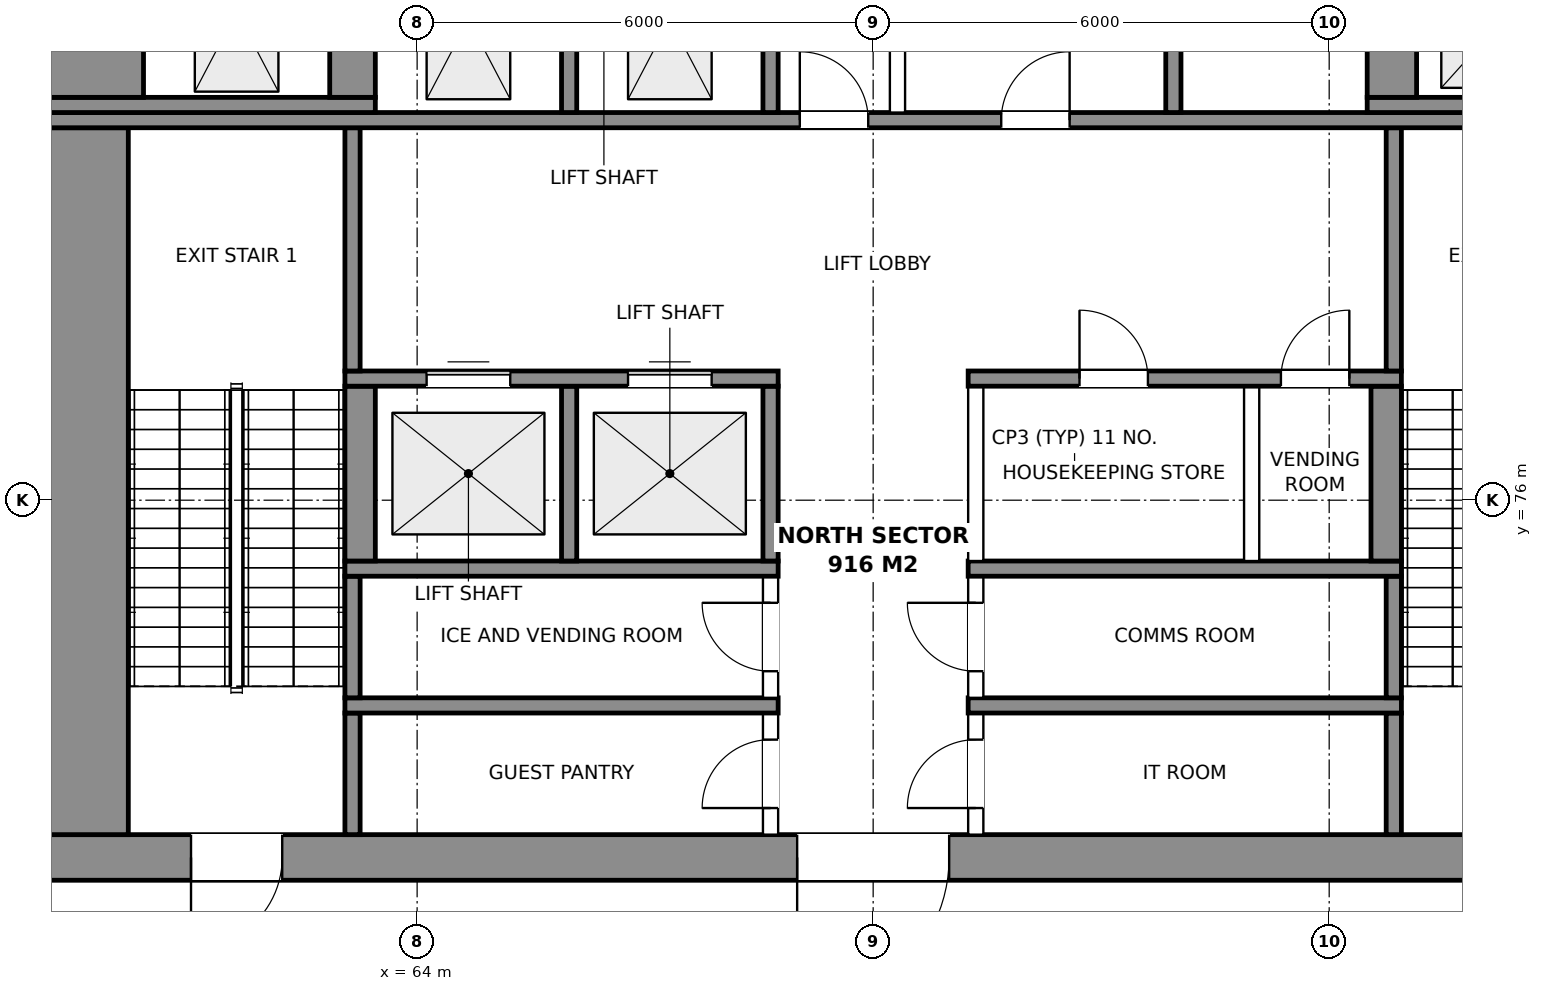
"""IFC4 building model, lengths in metres.
Left out: names, types, materials, properties, quantities, classifications, styles, units other than length and angle.
Written with IfcOpenShell. Run it as: python <this file> out.ifc"""

import sys

from ifc_helpers import new_model, si_unit, direction, frame, frame_2d, origin, place, context, subcontext, project, spatial, rectangle, extrude, element, fill, save


model = new_model("IFC4")
c1 = context("Model", 3, precision=1e-05, world=origin(), true_north=direction((0.0, 1.0)))
c2 = subcontext(c1, "Body", "Model", "MODEL_VIEW")
j1 = project(units=[si_unit("LENGTHUNIT", "METRE"), si_unit("PLANEANGLEUNIT", "RADIAN")], contexts=[c1])
p1 = place(None, origin())
s1 = spatial("IfcSite", under=j1, at=p1, CompositionType="ELEMENT")
p2 = place(p1, origin())
s2 = spatial("IfcBuilding", under=s1, at=p2, CompositionType="ELEMENT")
p3 = place(p2, frame((0.0, 0.0, 300.1)))
s3 = spatial("IfcBuildingStorey", under=s2, at=p3, CompositionType="ELEMENT", Elevation=300.1)
p4 = place(p3, frame((59.0, 71.3, 0.0), z_axis=(0.0, 0.0, 1.0), x_axis=(1.0, 0.0, 0.0)))
e1 = element("IfcWall", 1, at=p4, inside=s3, PredefinedType="SHEAR", context=c2, shape_type="SweptSolid", body=[
    extrude(rectangle(XDim=22.0, YDim=0.6, at=frame_2d((11.0, 0.0))), origin(), (0.0, 0.0, 1.0), 6.0),
])
p5 = place(p4, frame((2.025, 0.0, 0.0)))
e2 = element("IfcOpeningElement", 2, at=p5, cuts=e1, PredefinedType="OPENING", context=c2, shape_type="SweptSolid", body=[
    extrude(rectangle(XDim=1.2, YDim=2.1, at=frame_2d((0.6, 1.05))), frame((0.0, 0.31, 0.0), z_axis=(0.0, -1.0, 0.0), x_axis=(1.0, 0.0, 0.0)), (0.0, 0.0, 1.0), 0.62),
])
p6 = place(p4, frame((18.775, 0.0, 0.0)))
e3 = element("IfcOpeningElement", 3, at=p6, cuts=e1, PredefinedType="OPENING", context=c2, shape_type="SweptSolid", body=[
    extrude(rectangle(XDim=1.2, YDim=2.1, at=frame_2d((0.6, 1.05))), frame((0.0, 0.31, 0.0), z_axis=(0.0, -1.0, 0.0), x_axis=(1.0, 0.0, 0.0)), (0.0, 0.0, 1.0), 0.62),
])
p7 = place(p4, frame((10.0, 0.0, 0.0)))
e4 = element("IfcOpeningElement", 4, at=p7, cuts=e1, PredefinedType="OPENING", context=c2, shape_type="SweptSolid", body=[
    extrude(rectangle(XDim=2.0, YDim=2.1, at=frame_2d((1.0, 1.05))), frame((0.0, 0.31, 0.0), z_axis=(0.0, -1.0, 0.0), x_axis=(1.0, 0.0, 0.0)), (0.0, 0.0, 1.0), 0.62),
])
p8 = place(p3, frame((59.6, 71.6, 0.0), z_axis=(0.0, 0.0, 1.0), x_axis=(0.0, 1.0, 0.0)))
e5 = element("IfcWall", 5, at=p8, inside=s3, PredefinedType="SHEAR", context=c2, shape_type="SweptSolid", body=[
    extrude(rectangle(XDim=9.3, YDim=1.2, at=frame_2d((4.65, 0.0))), origin(), (0.0, 0.0, 1.0), 6.0),
])
p9 = place(p3, frame((63.15, 71.6, 0.0), z_axis=(0.0, 0.0, 1.0), x_axis=(0.0, 1.0, 0.0)))
e6 = element("IfcWall", 6, at=p9, inside=s3, PredefinedType="SHEAR", context=c2, shape_type="SweptSolid", body=[
    extrude(rectangle(XDim=1.6, YDim=0.2, at=frame_2d((0.8, 0.0))), origin(), (0.0, 0.0, 1.0), 6.0),
])
p10 = place(p3, frame((68.65, 71.6, 0.0), z_axis=(0.0, 0.0, 1.0), x_axis=(0.0, 1.0, 0.0)))
e7 = element("IfcWall", 7, at=p10, inside=s3, PredefinedType="PARTITIONING", context=c2, shape_type="SweptSolid", body=[
    extrude(rectangle(XDim=1.6, YDim=0.2, at=frame_2d((0.8, 0.0))), origin(), (0.0, 0.0, 1.0), 5.7),
])
p11 = place(p10, frame((0.35, 0.0, 0.0)))
e8 = element("IfcOpeningElement", 8, at=p11, cuts=e7, PredefinedType="OPENING", context=c2, shape_type="SweptSolid", body=[
    extrude(rectangle(XDim=0.9, YDim=2.1, at=frame_2d((0.45, 1.05))), frame((0.0, 0.11, 0.0), z_axis=(0.0, -1.0, 0.0), x_axis=(1.0, 0.0, 0.0)), (0.0, 0.0, 1.0), 0.22),
])
p12 = place(p3, frame((71.35, 71.6, 0.0), z_axis=(0.0, 0.0, 1.0), x_axis=(0.0, 1.0, 0.0)))
e9 = element("IfcWall", 9, at=p12, inside=s3, PredefinedType="PARTITIONING", context=c2, shape_type="SweptSolid", body=[
    extrude(rectangle(XDim=1.6, YDim=0.2, at=frame_2d((0.8, 0.0))), origin(), (0.0, 0.0, 1.0), 5.7),
])
p13 = place(p12, frame((0.35, 0.0, 0.0)))
e10 = element("IfcOpeningElement", 10, at=p13, cuts=e9, PredefinedType="OPENING", context=c2, shape_type="SweptSolid", body=[
    extrude(rectangle(XDim=0.9, YDim=2.1, at=frame_2d((0.45, 1.05))), frame((0.0, 0.11, 0.0), z_axis=(0.0, -1.0, 0.0), x_axis=(1.0, 0.0, 0.0)), (0.0, 0.0, 1.0), 0.22),
])
p14 = place(p3, frame((76.85, 71.6, 0.0), z_axis=(0.0, 0.0, 1.0), x_axis=(0.0, 1.0, 0.0)))
e11 = element("IfcWall", 11, at=p14, inside=s3, PredefinedType="SHEAR", context=c2, shape_type="SweptSolid", body=[
    extrude(rectangle(XDim=1.6, YDim=0.2, at=frame_2d((0.8, 0.0))), origin(), (0.0, 0.0, 1.0), 6.0),
])
for number, where, z_axis, x_axis in (
    (12, (63.05, 73.3, 0.0), (0.0, 0.0, 1.0), (1.0, 0.0, 0.0)),
    (13, (71.25, 73.3, 0.0), (0.0, 0.0, 1.0), (1.0, 0.0, 0.0)),
):
    element("IfcWall", number, at=place(p3, frame(where, z_axis=z_axis, x_axis=x_axis)), inside=s3, PredefinedType="SHEAR", context=c2, shape_type="SweptSolid", body=[
        extrude(rectangle(XDim=5.7, YDim=0.2, at=frame_2d((2.85, 0.0))), origin(), (0.0, 0.0, 1.0), 6.0),
    ])
p15 = place(p3, frame((63.15, 73.4, 0.0), z_axis=(0.0, 0.0, 1.0), x_axis=(0.0, 1.0, 0.0)))
e14 = element("IfcWall", 14, at=p15, inside=s3, PredefinedType="SHEAR", context=c2, shape_type="SweptSolid", body=[
    extrude(rectangle(XDim=1.6, YDim=0.2, at=frame_2d((0.8, 0.0))), origin(), (0.0, 0.0, 1.0), 6.0),
])
p16 = place(p3, frame((68.65, 73.4, 0.0), z_axis=(0.0, 0.0, 1.0), x_axis=(0.0, 1.0, 0.0)))
e15 = element("IfcWall", 15, at=p16, inside=s3, PredefinedType="PARTITIONING", context=c2, shape_type="SweptSolid", body=[
    extrude(rectangle(XDim=1.6, YDim=0.2, at=frame_2d((0.8, 0.0))), origin(), (0.0, 0.0, 1.0), 5.7),
])
p17 = place(p16, frame((0.35, 0.0, 0.0)))
e16 = element("IfcOpeningElement", 16, at=p17, cuts=e15, PredefinedType="OPENING", context=c2, shape_type="SweptSolid", body=[
    extrude(rectangle(XDim=0.9, YDim=2.1, at=frame_2d((0.45, 1.05))), frame((0.0, 0.11, 0.0), z_axis=(0.0, -1.0, 0.0), x_axis=(1.0, 0.0, 0.0)), (0.0, 0.0, 1.0), 0.22),
])
p18 = place(p3, frame((71.35, 73.4, 0.0), z_axis=(0.0, 0.0, 1.0), x_axis=(0.0, 1.0, 0.0)))
e17 = element("IfcWall", 17, at=p18, inside=s3, PredefinedType="PARTITIONING", context=c2, shape_type="SweptSolid", body=[
    extrude(rectangle(XDim=1.6, YDim=0.2, at=frame_2d((0.8, 0.0))), origin(), (0.0, 0.0, 1.0), 5.7),
])
p19 = place(p18, frame((0.35, 0.0, 0.0)))
e18 = element("IfcOpeningElement", 18, at=p19, cuts=e17, PredefinedType="OPENING", context=c2, shape_type="SweptSolid", body=[
    extrude(rectangle(XDim=0.9, YDim=2.1, at=frame_2d((0.45, 1.05))), frame((0.0, 0.11, 0.0), z_axis=(0.0, -1.0, 0.0), x_axis=(1.0, 0.0, 0.0)), (0.0, 0.0, 1.0), 0.22),
])
p20 = place(p3, frame((76.85, 73.4, 0.0), z_axis=(0.0, 0.0, 1.0), x_axis=(0.0, 1.0, 0.0)))
e19 = element("IfcWall", 19, at=p20, inside=s3, PredefinedType="SHEAR", context=c2, shape_type="SweptSolid", body=[
    extrude(rectangle(XDim=1.6, YDim=0.2, at=frame_2d((0.8, 0.0))), origin(), (0.0, 0.0, 1.0), 6.0),
])
for number, where, z_axis, x_axis in (
    (20, (63.05, 75.1, 0.0), (0.0, 0.0, 1.0), (1.0, 0.0, 0.0)),
    (21, (71.25, 75.1, 0.0), (0.0, 0.0, 1.0), (1.0, 0.0, 0.0)),
):
    element("IfcWall", number, at=place(p3, frame(where, z_axis=z_axis, x_axis=x_axis)), inside=s3, PredefinedType="SHEAR", context=c2, shape_type="SweptSolid", body=[
        extrude(rectangle(XDim=5.7, YDim=0.2, at=frame_2d((2.85, 0.0))), origin(), (0.0, 0.0, 1.0), 6.0),
    ])
p21 = place(p3, frame((63.25, 75.2, 0.0), z_axis=(0.0, 0.0, 1.0), x_axis=(0.0, 1.0, 0.0)))
e22 = element("IfcWall", 22, at=p21, inside=s3, PredefinedType="SHEAR", context=c2, shape_type="SweptSolid", body=[
    extrude(rectangle(XDim=2.3, YDim=0.4, at=frame_2d((1.15, 0.0))), origin(), (0.0, 0.0, 1.0), 6.0),
])
for number, where, z_axis, x_axis in (
    (23, (66.0, 75.2, 0.0), (0.0, 0.0, 1.0), (0.0, 1.0, 0.0)),
    (24, (68.65, 75.2, 0.0), (0.0, 0.0, 1.0), (0.0, 1.0, 0.0)),
):
    element("IfcWall", number, at=place(p3, frame(where, z_axis=z_axis, x_axis=x_axis)), inside=s3, PredefinedType="SHEAR", context=c2, shape_type="SweptSolid", body=[
        extrude(rectangle(XDim=2.3, YDim=0.2, at=frame_2d((1.15, 0.0))), origin(), (0.0, 0.0, 1.0), 6.0),
    ])
for number, where, z_axis, x_axis in (
    (25, (71.35, 75.2, 0.0), (0.0, 0.0, 1.0), (0.0, 1.0, 0.0)),
    (26, (74.98, 75.2, 0.0), (0.0, 0.0, 1.0), (0.0, 1.0, 0.0)),
):
    element("IfcWall", number, at=place(p3, frame(where, z_axis=z_axis, x_axis=x_axis)), inside=s3, PredefinedType="PARTITIONING", context=c2, shape_type="SweptSolid", body=[
        extrude(rectangle(XDim=2.3, YDim=0.2, at=frame_2d((1.15, 0.0))), origin(), (0.0, 0.0, 1.0), 5.7),
    ])
p22 = place(p3, frame((76.75, 75.2, 0.0), z_axis=(0.0, 0.0, 1.0), x_axis=(0.0, 1.0, 0.0)))
e27 = element("IfcWall", 27, at=p22, inside=s3, PredefinedType="SHEAR", context=c2, shape_type="SweptSolid", body=[
    extrude(rectangle(XDim=2.3, YDim=0.4, at=frame_2d((1.15, 0.0))), origin(), (0.0, 0.0, 1.0), 6.0),
])
p23 = place(p3, frame((63.05, 77.6, 0.0), z_axis=(0.0, 0.0, 1.0), x_axis=(1.0, 0.0, 0.0)))
e28 = element("IfcWall", 28, at=p23, inside=s3, PredefinedType="SHEAR", context=c2, shape_type="SweptSolid", body=[
    extrude(rectangle(XDim=5.7, YDim=0.2, at=frame_2d((2.85, 0.0))), origin(), (0.0, 0.0, 1.0), 6.0),
])
p24 = place(p23, frame((1.075, 0.0, 0.0)))
e29 = element("IfcOpeningElement", 29, at=p24, cuts=e28, PredefinedType="OPENING", context=c2, shape_type="SweptSolid", body=[
    extrude(rectangle(XDim=1.1, YDim=2.1, at=frame_2d((0.55, 1.05))), frame((0.0, 0.11, 0.0), z_axis=(0.0, -1.0, 0.0), x_axis=(1.0, 0.0, 0.0)), (0.0, 0.0, 1.0), 0.22),
])
p25 = place(p23, frame((3.725, 0.0, 0.0)))
e30 = element("IfcOpeningElement", 30, at=p25, cuts=e28, PredefinedType="OPENING", context=c2, shape_type="SweptSolid", body=[
    extrude(rectangle(XDim=1.1, YDim=2.1, at=frame_2d((0.55, 1.05))), frame((0.0, 0.11, 0.0), z_axis=(0.0, -1.0, 0.0), x_axis=(1.0, 0.0, 0.0)), (0.0, 0.0, 1.0), 0.22),
])
p26 = place(p3, frame((71.25, 77.6, 0.0), z_axis=(0.0, 0.0, 1.0), x_axis=(1.0, 0.0, 0.0)))
e31 = element("IfcWall", 31, at=p26, inside=s3, PredefinedType="SHEAR", context=c2, shape_type="SweptSolid", body=[
    extrude(rectangle(XDim=5.7, YDim=0.2, at=frame_2d((2.85, 0.0))), origin(), (0.0, 0.0, 1.0), 6.0),
])
p27 = place(p26, frame((1.465, 0.0, 0.0)))
e32 = element("IfcOpeningElement", 32, at=p27, cuts=e31, PredefinedType="OPENING", context=c2, shape_type="SweptSolid", body=[
    extrude(rectangle(XDim=0.9, YDim=2.1, at=frame_2d((0.45, 1.05))), frame((0.0, 0.11, 0.0), z_axis=(0.0, -1.0, 0.0), x_axis=(1.0, 0.0, 0.0)), (0.0, 0.0, 1.0), 0.22),
])
p28 = place(p26, frame((4.115, 0.0, 0.0)))
e33 = element("IfcOpeningElement", 33, at=p28, cuts=e31, PredefinedType="OPENING", context=c2, shape_type="SweptSolid", body=[
    extrude(rectangle(XDim=0.9, YDim=2.1, at=frame_2d((0.45, 1.05))), frame((0.0, 0.11, 0.0), z_axis=(0.0, -1.0, 0.0), x_axis=(1.0, 0.0, 0.0)), (0.0, 0.0, 1.0), 0.22),
])
for number, where, z_axis, x_axis in (
    (34, (63.15, 77.7, 0.0), (0.0, 0.0, 1.0), (0.0, 1.0, 0.0)),
    (35, (76.85, 77.7, 0.0), (0.0, 0.0, 1.0), (0.0, 1.0, 0.0)),
):
    element("IfcWall", number, at=place(p3, frame(where, z_axis=z_axis, x_axis=x_axis)), inside=s3, PredefinedType="SHEAR", context=c2, shape_type="SweptSolid", body=[
        extrude(rectangle(XDim=3.2, YDim=0.2, at=frame_2d((1.6, 0.0))), origin(), (0.0, 0.0, 1.0), 6.0),
    ])
p29 = place(p3, frame((59.0, 81.0, 0.0), z_axis=(0.0, 0.0, 1.0), x_axis=(1.0, 0.0, 0.0)))
e36 = element("IfcWall", 36, at=p29, inside=s3, PredefinedType="SHEAR", context=c2, shape_type="SweptSolid", body=[
    extrude(rectangle(XDim=22.0, YDim=0.2, at=frame_2d((11.0, 0.0))), origin(), (0.0, 0.0, 1.0), 6.0),
])
p30 = place(p29, frame((10.035, 0.0, 0.0)))
e37 = element("IfcOpeningElement", 37, at=p30, cuts=e36, PredefinedType="OPENING", context=c2, shape_type="SweptSolid", body=[
    extrude(rectangle(XDim=0.9, YDim=2.1, at=frame_2d((0.45, 1.05))), frame((0.0, 0.11, 0.0), z_axis=(0.0, -1.0, 0.0), x_axis=(1.0, 0.0, 0.0)), (0.0, 0.0, 1.0), 0.22),
])
p31 = place(p29, frame((12.685, 0.0, 0.0)))
e38 = element("IfcOpeningElement", 38, at=p31, cuts=e36, PredefinedType="OPENING", context=c2, shape_type="SweptSolid", body=[
    extrude(rectangle(XDim=0.9, YDim=2.1, at=frame_2d((0.45, 1.05))), frame((0.0, 0.11, 0.0), z_axis=(0.0, -1.0, 0.0), x_axis=(1.0, 0.0, 0.0)), (0.0, 0.0, 1.0), 0.22),
])
p32 = place(p3, frame((59.0, 81.2, 0.0), z_axis=(0.0, 0.0, 1.0), x_axis=(1.0, 0.0, 0.0)))
e39 = element("IfcWall", 39, at=p32, inside=s3, PredefinedType="SHEAR", context=c2, shape_type="SweptSolid", body=[
    extrude(rectangle(XDim=4.45, YDim=0.2, at=frame_2d((2.225, 0.0))), origin(), (0.0, 0.0, 1.0), 6.0),
])
for number, where, z_axis, x_axis in (
    (40, (66.0, 81.1, 0.0), (0.0, 0.0, 1.0), (0.0, 1.0, 0.0)),
    (41, (68.65, 81.1, 0.0), (0.0, 0.0, 1.0), (0.0, 1.0, 0.0)),
):
    element("IfcWall", number, at=place(p3, frame(where, z_axis=z_axis, x_axis=x_axis)), inside=s3, PredefinedType="SHEAR", context=c2, shape_type="SweptSolid", body=[
        extrude(rectangle(XDim=2.45, YDim=0.2, at=frame_2d((1.225, 0.0))), origin(), (0.0, 0.0, 1.0), 6.0),
    ])
p33 = place(p3, frame((70.32, 81.1, 0.0), z_axis=(0.0, 0.0, 1.0), x_axis=(0.0, 1.0, 0.0)))
e42 = element("IfcWall", 42, at=p33, inside=s3, PredefinedType="PARTITIONING", context=c2, shape_type="SweptSolid", body=[
    extrude(rectangle(XDim=2.45, YDim=0.2, at=frame_2d((1.225, 0.0))), origin(), (0.0, 0.0, 1.0), 5.7),
])
p34 = place(p3, frame((73.95, 81.1, 0.0), z_axis=(0.0, 0.0, 1.0), x_axis=(0.0, 1.0, 0.0)))
e43 = element("IfcWall", 43, at=p34, inside=s3, PredefinedType="SHEAR", context=c2, shape_type="SweptSolid", body=[
    extrude(rectangle(XDim=2.45, YDim=0.2, at=frame_2d((1.225, 0.0))), origin(), (0.0, 0.0, 1.0), 6.0),
])
p35 = place(p3, frame((76.5, 81.2, 0.0), z_axis=(0.0, 0.0, 1.0), x_axis=(1.0, 0.0, 0.0)))
e44 = element("IfcWall", 44, at=p35, inside=s3, PredefinedType="SHEAR", context=c2, shape_type="SweptSolid", body=[
    extrude(rectangle(XDim=4.5, YDim=0.2, at=frame_2d((2.25, 0.0))), origin(), (0.0, 0.0, 1.0), 6.0),
])
p36 = place(p3, frame((59.7, 81.3, 0.0), z_axis=(0.0, 0.0, 1.0), x_axis=(0.0, 1.0, 0.0)))
e45 = element("IfcWall", 45, at=p36, inside=s3, PredefinedType="SHEAR", context=c2, shape_type="SweptSolid", body=[
    extrude(rectangle(XDim=2.25, YDim=1.4, at=frame_2d((1.125, 0.0))), origin(), (0.0, 0.0, 1.0), 6.0),
])
p37 = place(p3, frame((63.15, 81.3, 0.0), z_axis=(0.0, 0.0, 1.0), x_axis=(0.0, 1.0, 0.0)))
e46 = element("IfcWall", 46, at=p37, inside=s3, PredefinedType="SHEAR", context=c2, shape_type="SweptSolid", body=[
    extrude(rectangle(XDim=2.25, YDim=0.6, at=frame_2d((1.125, 0.0))), origin(), (0.0, 0.0, 1.0), 6.0),
])
p38 = place(p3, frame((76.825, 81.3, 0.0), z_axis=(0.0, 0.0, 1.0), x_axis=(0.0, 1.0, 0.0)))
e47 = element("IfcWall", 47, at=p38, inside=s3, PredefinedType="SHEAR", context=c2, shape_type="SweptSolid", body=[
    extrude(rectangle(XDim=2.25, YDim=0.65, at=frame_2d((1.125, 0.0))), origin(), (0.0, 0.0, 1.0), 6.0),
])
p39 = place(p5, frame((1.2, 0.0, 0.0), z_axis=(0.0, 0.0, 1.0), x_axis=(-1.0, 0.0, 0.0)))
e48 = element("IfcDoor", 48, at=p39, inside=s3, OperationType="SINGLE_SWING_RIGHT", PredefinedType="DOOR", context=c2, shape_type="SweptSolid", body=[
    extrude(rectangle(XDim=1.2, YDim=2.1, at=frame_2d((0.6, 1.05))), frame((0.0, 0.025, 0.0), z_axis=(0.0, -1.0, 0.0), x_axis=(1.0, 0.0, 0.0)), (0.0, 0.0, 1.0), 0.05),
])
fill(e2, e48)
p40 = place(p7, frame((2.0, 0.0, 0.0), z_axis=(0.0, 0.0, 1.0), x_axis=(-1.0, 0.0, 0.0)))
e49 = element("IfcDoor", 49, at=p40, inside=s3, OperationType="DOUBLE_DOOR_SINGLE_SWING", PredefinedType="DOOR", context=c2, shape_type="SweptSolid", body=[
    extrude(rectangle(XDim=2.0, YDim=2.1, at=frame_2d((1.0, 1.05))), frame((0.0, 0.025, 0.0), z_axis=(0.0, -1.0, 0.0), x_axis=(1.0, 0.0, 0.0)), (0.0, 0.0, 1.0), 0.05),
])
fill(e4, e49)
p41 = place(p11, origin())
e50 = element("IfcDoor", 50, at=p41, inside=s3, OperationType="SINGLE_SWING_LEFT", PredefinedType="DOOR", context=c2, shape_type="SweptSolid", body=[
    extrude(rectangle(XDim=0.9, YDim=2.1, at=frame_2d((0.45, 1.05))), frame((0.0, 0.025, 0.0), z_axis=(0.0, -1.0, 0.0), x_axis=(1.0, 0.0, 0.0)), (0.0, 0.0, 1.0), 0.05),
])
fill(e8, e50)
p42 = place(p17, origin())
e51 = element("IfcDoor", 51, at=p42, inside=s3, OperationType="SINGLE_SWING_RIGHT", PredefinedType="DOOR", context=c2, shape_type="SweptSolid", body=[
    extrude(rectangle(XDim=0.9, YDim=2.1, at=frame_2d((0.45, 1.05))), frame((0.0, 0.025, 0.0), z_axis=(0.0, -1.0, 0.0), x_axis=(1.0, 0.0, 0.0)), (0.0, 0.0, 1.0), 0.05),
])
fill(e16, e51)
p43 = place(p13, origin())
e52 = element("IfcDoor", 52, at=p43, inside=s3, OperationType="SINGLE_SWING_LEFT", PredefinedType="DOOR", context=c2, shape_type="SweptSolid", body=[
    extrude(rectangle(XDim=0.9, YDim=2.1, at=frame_2d((0.45, 1.05))), frame((0.0, 0.025, 0.0), z_axis=(0.0, -1.0, 0.0), x_axis=(1.0, 0.0, 0.0)), (0.0, 0.0, 1.0), 0.05),
])
fill(e10, e52)
p44 = place(p19, origin())
e53 = element("IfcDoor", 53, at=p44, inside=s3, OperationType="SINGLE_SWING_RIGHT", PredefinedType="DOOR", context=c2, shape_type="SweptSolid", body=[
    extrude(rectangle(XDim=0.9, YDim=2.1, at=frame_2d((0.45, 1.05))), frame((0.0, 0.025, 0.0), z_axis=(0.0, -1.0, 0.0), x_axis=(1.0, 0.0, 0.0)), (0.0, 0.0, 1.0), 0.05),
])
fill(e18, e53)
p45 = place(p24, origin())
e54 = element("IfcDoor", 54, at=p45, inside=s3, OperationType="DOUBLE_DOOR_SLIDING", PredefinedType="DOOR", context=c2, shape_type="SweptSolid", body=[
    extrude(rectangle(XDim=1.1, YDim=2.1, at=frame_2d((0.55, 1.05))), frame((0.0, 0.025, 0.0), z_axis=(0.0, -1.0, 0.0), x_axis=(1.0, 0.0, 0.0)), (0.0, 0.0, 1.0), 0.05),
])
fill(e29, e54)
p46 = place(p25, origin())
e55 = element("IfcDoor", 55, at=p46, inside=s3, OperationType="DOUBLE_DOOR_SLIDING", PredefinedType="DOOR", context=c2, shape_type="SweptSolid", body=[
    extrude(rectangle(XDim=1.1, YDim=2.1, at=frame_2d((0.55, 1.05))), frame((0.0, 0.025, 0.0), z_axis=(0.0, -1.0, 0.0), x_axis=(1.0, 0.0, 0.0)), (0.0, 0.0, 1.0), 0.05),
])
fill(e30, e55)
p47 = place(p27, origin())
e56 = element("IfcDoor", 56, at=p47, inside=s3, OperationType="SINGLE_SWING_LEFT", PredefinedType="DOOR", context=c2, shape_type="SweptSolid", body=[
    extrude(rectangle(XDim=0.9, YDim=2.1, at=frame_2d((0.45, 1.05))), frame((0.0, 0.025, 0.0), z_axis=(0.0, -1.0, 0.0), x_axis=(1.0, 0.0, 0.0)), (0.0, 0.0, 1.0), 0.05),
])
fill(e32, e56)
p48 = place(p28, origin())
e57 = element("IfcDoor", 57, at=p48, inside=s3, OperationType="SINGLE_SWING_RIGHT", PredefinedType="DOOR", context=c2, shape_type="SweptSolid", body=[
    extrude(rectangle(XDim=0.9, YDim=2.1, at=frame_2d((0.45, 1.05))), frame((0.0, 0.025, 0.0), z_axis=(0.0, -1.0, 0.0), x_axis=(1.0, 0.0, 0.0)), (0.0, 0.0, 1.0), 0.05),
])
fill(e33, e57)
p49 = place(p30, origin())
e58 = element("IfcDoor", 58, at=p49, inside=s3, OperationType="SINGLE_SWING_LEFT", PredefinedType="DOOR", context=c2, shape_type="SweptSolid", body=[
    extrude(rectangle(XDim=0.9, YDim=2.1, at=frame_2d((0.45, 1.05))), frame((0.0, 0.025, 0.0), z_axis=(0.0, -1.0, 0.0), x_axis=(1.0, 0.0, 0.0)), (0.0, 0.0, 1.0), 0.05),
])
fill(e37, e58)
p50 = place(p31, origin())
e59 = element("IfcDoor", 59, at=p50, inside=s3, OperationType="SINGLE_SWING_RIGHT", PredefinedType="DOOR", context=c2, shape_type="SweptSolid", body=[
    extrude(rectangle(XDim=0.9, YDim=2.1, at=frame_2d((0.45, 1.05))), frame((0.0, 0.025, 0.0), z_axis=(0.0, -1.0, 0.0), x_axis=(1.0, 0.0, 0.0)), (0.0, 0.0, 1.0), 0.05),
])
fill(e38, e59)
save(model, sys.argv[1])
